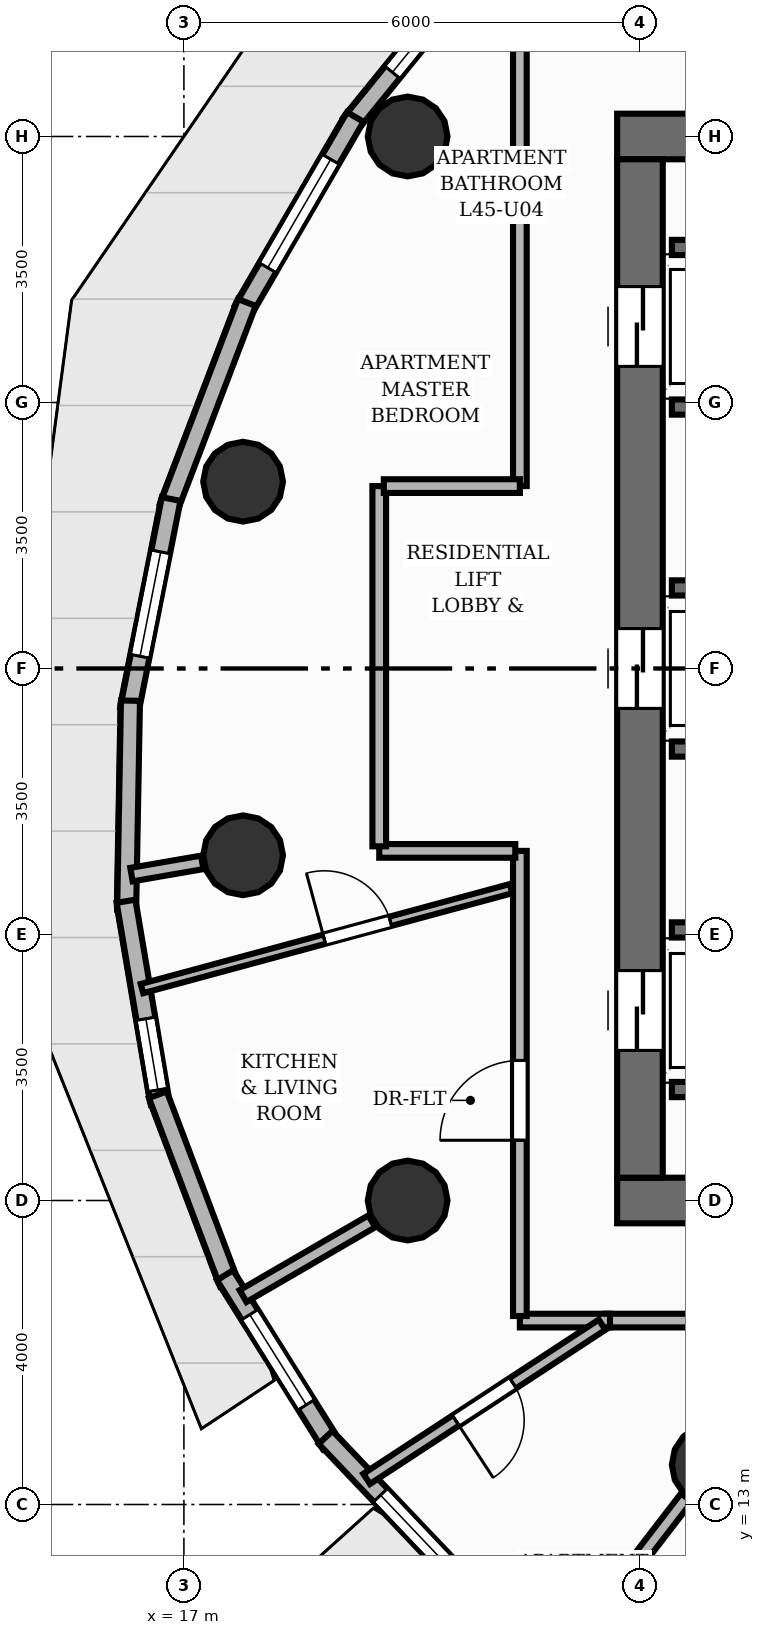
"""IFC4 building model, lengths in metres.
Left out: names, types, materials, properties, quantities, classifications, styles, units other than length and angle.
Written with IfcOpenShell. Run it as: python <this file> out.ifc"""

import sys

from ifc_helpers import new_model, si_unit, direction, frame, frame_2d, origin, origin_2d, place, context, subcontext, project, spatial, rectangle, circle, extrude, element, fill, save


model = new_model("IFC4")
c1 = context("Model", 3, precision=1e-05, world=origin(), true_north=direction((0.0, 1.0)))
c2 = subcontext(c1, "Body", "Model", "MODEL_VIEW")
j1 = project(units=[si_unit("LENGTHUNIT", "METRE"), si_unit("PLANEANGLEUNIT", "RADIAN")], contexts=[c1])
p1 = place(None, origin())
s1 = spatial("IfcSite", under=j1, at=p1, CompositionType="ELEMENT")
p2 = place(p1, origin())
s2 = spatial("IfcBuilding", under=s1, at=p2, CompositionType="ELEMENT")
p3 = place(p2, frame((0.0, 0.0, 152.16)))
s3 = spatial("IfcBuildingStorey", under=s2, at=p3, CompositionType="ELEMENT", Elevation=152.16)
p4 = place(p3, frame((22.7, 17.0, 0.0), z_axis=(0.0, 0.0, 1.0), x_axis=(1.0, 0.0, 0.0)))
e1 = element("IfcWall", 1, at=p4, inside=s3, PredefinedType="SHEAR", context=c2, shape_type="SweptSolid", body=[
    extrude(rectangle(XDim=15.1, YDim=0.6, at=frame_2d((7.55, 0.0))), origin(), (0.0, 0.0, 1.0), 3.2),
])
p5 = place(p4, frame((5.8, 0.0, 0.0)))
e2 = element("IfcOpeningElement", 2, at=p5, cuts=e1, PredefinedType="OPENING", context=c2, shape_type="SweptSolid", body=[
    extrude(rectangle(XDim=1.1, YDim=2.15, at=frame_2d((0.55, 1.075))), frame((0.0, 0.31, 0.0), z_axis=(0.0, -1.0, 0.0), x_axis=(1.0, 0.0, 0.0)), (0.0, 0.0, 1.0), 0.62),
])
p6 = place(p4, frame((9.35, 0.0, 0.0)))
e3 = element("IfcOpeningElement", 3, at=p6, cuts=e1, PredefinedType="OPENING", context=c2, shape_type="SweptSolid", body=[
    extrude(rectangle(XDim=0.9, YDim=2.1, at=frame_2d((0.45, 1.05))), frame((0.0, 0.31, 0.0), z_axis=(0.0, -1.0, 0.0), x_axis=(1.0, 0.0, 0.0)), (0.0, 0.0, 1.0), 0.62),
])
p7 = place(p3, frame((22.7, 31.0, 0.0), z_axis=(0.0, 0.0, 1.0), x_axis=(1.0, 0.0, 0.0)))
e4 = element("IfcWall", 4, at=p7, inside=s3, PredefinedType="SHEAR", context=c2, shape_type="SweptSolid", body=[
    extrude(rectangle(XDim=15.1, YDim=0.6, at=frame_2d((7.55, 0.0))), origin(), (0.0, 0.0, 1.0), 3.2),
])
p8 = place(p7, frame((11.7, 0.0, 0.0)))
e5 = element("IfcOpeningElement", 5, at=p8, cuts=e4, PredefinedType="OPENING", context=c2, shape_type="SweptSolid", body=[
    extrude(rectangle(XDim=1.1, YDim=2.15, at=frame_2d((0.55, 1.075))), frame((0.0, 0.31, 0.0), z_axis=(0.0, -1.0, 0.0), x_axis=(1.0, 0.0, 0.0)), (0.0, 0.0, 1.0), 0.62),
])
p9 = place(p3, frame((23.0, 17.3, 0.0), z_axis=(0.0, 0.0, 1.0), x_axis=(0.0, 1.0, 0.0)))
e6 = element("IfcWall", 6, at=p9, inside=s3, PredefinedType="SHEAR", context=c2, shape_type="SweptSolid", body=[
    extrude(rectangle(XDim=13.4, YDim=0.6, at=frame_2d((6.7, 0.0))), origin(), (0.0, 0.0, 1.0), 3.2),
])
p10 = place(p9, frame((1.675, 0.0, 0.0)))
e7 = element("IfcOpeningElement", 7, at=p10, cuts=e6, PredefinedType="OPENING", context=c2, shape_type="SweptSolid", body=[
    extrude(rectangle(XDim=1.05, YDim=2.15, at=frame_2d((0.525, 1.075))), frame((0.0, 0.31, 0.0), z_axis=(0.0, -1.0, 0.0), x_axis=(1.0, 0.0, 0.0)), (0.0, 0.0, 1.0), 0.62),
])
p11 = place(p9, frame((6.175, 0.0, 0.0)))
e8 = element("IfcOpeningElement", 8, at=p11, cuts=e6, PredefinedType="OPENING", context=c2, shape_type="SweptSolid", body=[
    extrude(rectangle(XDim=1.05, YDim=2.15, at=frame_2d((0.525, 1.075))), frame((0.0, 0.31, 0.0), z_axis=(0.0, -1.0, 0.0), x_axis=(1.0, 0.0, 0.0)), (0.0, 0.0, 1.0), 0.62),
])
p12 = place(p9, frame((10.675, 0.0, 0.0)))
e9 = element("IfcOpeningElement", 9, at=p12, cuts=e6, PredefinedType="OPENING", context=c2, shape_type="SweptSolid", body=[
    extrude(rectangle(XDim=1.05, YDim=2.15, at=frame_2d((0.525, 1.075))), frame((0.0, 0.31, 0.0), z_axis=(0.0, -1.0, 0.0), x_axis=(1.0, 0.0, 0.0)), (0.0, 0.0, 1.0), 0.62),
])
for number, where, z_axis, x_axis in (
    (10, (19.944, 31.0, 0.0), (0.0, 0.0, 1.0), (1.0, 0.0, 0.0)),
    (11, (17.779, 26.458, 0.0), (0.0, 0.0, 1.0), (1.0, 0.0, 0.0)),
    (12, (17.779, 21.542, 0.0), (0.0, 0.0, 1.0), (1.0, 0.0, 0.0)),
    (13, (19.944, 17.0, 0.0), (0.0, 0.0, 1.0), (1.0, 0.0, 0.0)),
    (14, (23.944, 13.523, 0.0), (0.0, 0.0, 1.0), (1.0, 0.0, 0.0)),
):
    element("IfcColumn", number, at=place(p3, frame(where, z_axis=z_axis, x_axis=x_axis)), inside=s3, PredefinedType="COLUMN", context=c2, shape_type="SweptSolid", body=[
        extrude(circle(Radius=0.525, at=origin_2d()), origin(), (0.0, 0.0, 1.0), 3.2),
    ])
p13 = place(p3, frame((19.193, 31.167, 0.0), z_axis=(0.0, 0.0, 1.0), x_axis=(0.630478385784, 0.776206805599, 0.0)))
e15 = element("IfcWall", 15, at=p13, inside=s3, PredefinedType="SOLIDWALL", context=c2, shape_type="SweptSolid", body=[
    extrude(rectangle(XDim=2.977, YDim=0.25, at=frame_2d((1.489, 0.0))), origin(), (0.0, 0.0, 1.0), 2.96),
])
p14 = place(p13, frame((0.873, 0.0, 0.85)))
e16 = element("IfcOpeningElement", 16, at=p14, cuts=e15, PredefinedType="OPENING", context=c2, shape_type="SweptSolid", body=[
    extrude(rectangle(XDim=1.65, YDim=1.55, at=frame_2d((0.825, 0.775))), frame((0.0, 0.135, 0.0), z_axis=(0.0, -1.0, 0.0), x_axis=(1.0, 0.0, 0.0)), (0.0, 0.0, 1.0), 0.27),
])
p15 = place(p3, frame((17.781, 28.717, 0.0), z_axis=(0.0, 0.0, 1.0), x_axis=(0.502009170613, 0.864862296912, 0.0)))
e17 = element("IfcWall", 17, at=p15, inside=s3, PredefinedType="SOLIDWALL", context=c2, shape_type="SweptSolid", body=[
    extrude(rectangle(XDim=2.937, YDim=0.25, at=frame_2d((1.469, 0.0))), origin(), (0.0, 0.0, 1.0), 2.96),
])
p16 = place(p15, frame((0.643, 0.0, 0.85)))
e18 = element("IfcOpeningElement", 18, at=p16, cuts=e17, PredefinedType="OPENING", context=c2, shape_type="SweptSolid", body=[
    extrude(rectangle(XDim=1.65, YDim=1.55, at=frame_2d((0.825, 0.775))), frame((0.0, 0.135, 0.0), z_axis=(0.0, -1.0, 0.0), x_axis=(1.0, 0.0, 0.0)), (0.0, 0.0, 1.0), 0.27),
])
p17 = place(p3, frame((16.802, 26.123, 0.0), z_axis=(0.0, 0.0, 1.0), x_axis=(0.356178525313, 0.934417924756, 0.0)))
e19 = element("IfcWall", 19, at=p17, inside=s3, PredefinedType="SOLIDWALL", context=c2, shape_type="SweptSolid", body=[
    extrude(rectangle(XDim=2.882, YDim=0.25, at=frame_2d((1.441, 0.0))), origin(), (0.0, 0.0, 1.0), 2.96),
])
p18 = place(p3, frame((16.285, 23.466, 0.0), z_axis=(0.0, 0.0, 1.0), x_axis=(0.194099406303, 0.980981865517, 0.0)))
e20 = element("IfcWall", 20, at=p18, inside=s3, PredefinedType="SOLIDWALL", context=c2, shape_type="SweptSolid", body=[
    extrude(rectangle(XDim=2.817, YDim=0.25, at=frame_2d((1.409, 0.0))), origin(), (0.0, 0.0, 1.0), 2.96),
])
p19 = place(p18, frame((0.709, 0.0, 0.85)))
e21 = element("IfcOpeningElement", 21, at=p19, cuts=e20, PredefinedType="OPENING", context=c2, shape_type="SweptSolid", body=[
    extrude(rectangle(XDim=1.4, YDim=1.55, at=frame_2d((0.7, 0.775))), frame((0.0, 0.135, 0.0), z_axis=(0.0, -1.0, 0.0), x_axis=(1.0, 0.0, 0.0)), (0.0, 0.0, 1.0), 0.27),
])
p20 = place(p3, frame((16.247, 20.825, 0.0), z_axis=(0.0, 0.0, 1.0), x_axis=(0.018273942119, 0.999833017578, 0.0)))
e22 = element("IfcWall", 22, at=p20, inside=s3, PredefinedType="SOLIDWALL", context=c2, shape_type="SweptSolid", body=[
    extrude(rectangle(XDim=2.752, YDim=0.25, at=frame_2d((1.376, 0.0))), origin(), (0.0, 0.0, 1.0), 2.96),
])
p21 = place(p3, frame((16.687, 18.282, 0.0), z_axis=(0.0, 0.0, 1.0), x_axis=(-0.166721354457, 0.9860040517, 0.0)))
e23 = element("IfcWall", 23, at=p21, inside=s3, PredefinedType="SOLIDWALL", context=c2, shape_type="SweptSolid", body=[
    extrude(rectangle(XDim=2.693, YDim=0.25, at=frame_2d((1.346, 0.0))), origin(), (0.0, 0.0, 1.0), 2.96),
])
p22 = place(p21, frame((0.175, 0.0, 0.85)))
e24 = element("IfcOpeningElement", 24, at=p22, cuts=e23, PredefinedType="OPENING", context=c2, shape_type="SweptSolid", body=[
    extrude(rectangle(XDim=0.95, YDim=1.45, at=frame_2d((0.475, 0.725))), frame((0.0, 0.135, 0.0), z_axis=(0.0, -1.0, 0.0), x_axis=(1.0, 0.0, 0.0)), (0.0, 0.0, 1.0), 0.27),
])
p23 = place(p3, frame((17.592, 15.914, 0.0), z_axis=(0.0, 0.0, 1.0), x_axis=(-0.353022229402, 0.93561493444, 0.0)))
e25 = element("IfcWall", 25, at=p23, inside=s3, PredefinedType="SOLIDWALL", context=c2, shape_type="SweptSolid", body=[
    extrude(rectangle(XDim=2.648, YDim=0.25, at=frame_2d((1.324, 0.0))), origin(), (0.0, 0.0, 1.0), 2.96),
])
p24 = place(p3, frame((18.934, 13.793, 0.0), z_axis=(0.0, 0.0, 1.0), x_axis=(-0.530726374543, 0.847543223302, 0.0)))
e26 = element("IfcWall", 26, at=p24, inside=s3, PredefinedType="SOLIDWALL", context=c2, shape_type="SweptSolid", body=[
    extrude(rectangle(XDim=2.624, YDim=0.25, at=frame_2d((1.312, 0.0))), origin(), (0.0, 0.0, 1.0), 2.96),
])
p25 = place(p24, frame((0.612, 0.0, 0.85)))
e27 = element("IfcOpeningElement", 27, at=p25, cuts=e26, PredefinedType="OPENING", context=c2, shape_type="SweptSolid", body=[
    extrude(rectangle(XDim=1.4, YDim=1.45, at=frame_2d((0.7, 0.725))), frame((0.0, 0.135, 0.0), z_axis=(0.0, -1.0, 0.0), x_axis=(1.0, 0.0, 0.0)), (0.0, 0.0, 1.0), 0.27),
])
p26 = place(p3, frame((20.672, 11.981, 0.0), z_axis=(0.0, 0.0, 1.0), x_axis=(-0.688923042016, 0.724834492957, 0.0)))
e28 = element("IfcWall", 28, at=p26, inside=s3, PredefinedType="SOLIDWALL", context=c2, shape_type="SweptSolid", body=[
    extrude(rectangle(XDim=2.624, YDim=0.25, at=frame_2d((1.312, 0.0))), origin(), (0.0, 0.0, 1.0), 2.96),
])
p27 = place(p26, frame((0.175, 0.0, 0.85)))
e29 = element("IfcOpeningElement", 29, at=p27, cuts=e28, PredefinedType="OPENING", context=c2, shape_type="SweptSolid", body=[
    extrude(rectangle(XDim=1.4, YDim=1.55, at=frame_2d((0.7, 0.775))), frame((0.0, 0.135, 0.0), z_axis=(0.0, -1.0, 0.0), x_axis=(1.0, 0.0, 0.0)), (0.0, 0.0, 1.0), 0.27),
])
for number, where, z_axis, x_axis in (
    (30, (23.42, 18.46, 0.0), (0.0, 0.0, 1.0), (1.0, 0.0, 0.0)),
    (31, (23.42, 29.54, 0.0), (0.0, 0.0, 1.0), (1.0, 0.0, 0.0)),
    (32, (23.42, 20.56, 0.0), (0.0, 0.0, 1.0), (1.0, 0.0, 0.0)),
    (33, (23.42, 22.94, 0.0), (0.0, 0.0, 1.0), (1.0, 0.0, 0.0)),
    (34, (23.42, 25.06, 0.0), (0.0, 0.0, 1.0), (1.0, 0.0, 0.0)),
    (35, (23.42, 27.44, 0.0), (0.0, 0.0, 1.0), (1.0, 0.0, 0.0)),
):
    element("IfcWall", number, at=place(p3, frame(where, z_axis=z_axis, x_axis=x_axis)), inside=s3, PredefinedType="SHEAR", context=c2, shape_type="SweptSolid", body=[
        extrude(rectangle(XDim=1.71, YDim=0.2, at=frame_2d((0.855, 0.0))), origin(), (0.0, 0.0, 1.0), 3.2),
    ])
p28 = place(p3, frame((17.242, 21.449, 0.0), z_axis=(0.0, 0.0, 1.0), x_axis=(-0.985363023372, -0.170469094476, 0.0)))
e36 = element("IfcWall", 36, at=p28, inside=s3, PredefinedType="PARTITIONING", context=c2, shape_type="SweptSolid", body=[
    extrude(rectangle(XDim=0.945, YDim=0.18, at=frame_2d((0.473, 0.0))), origin(), (0.0, 0.0, 1.0), 2.336),
])
p29 = place(p3, frame((19.472, 16.726, 0.0), z_axis=(0.0, 0.0, 1.0), x_axis=(-0.864794183852, -0.502126497584, 0.0)))
e37 = element("IfcWall", 37, at=p29, inside=s3, PredefinedType="PARTITIONING", context=c2, shape_type="SweptSolid", body=[
    extrude(rectangle(XDim=1.959, YDim=0.18, at=frame_2d((0.979, 0.0))), origin(), (0.0, 0.0, 1.0), 2.336),
])
p30 = place(p3, frame((23.612, 13.092, 0.0), z_axis=(0.0, 0.0, 1.0), x_axis=(-0.609529171404, -0.79276364019, 0.0)))
e38 = element("IfcWall", 38, at=p30, inside=s3, PredefinedType="PARTITIONING", context=c2, shape_type="SweptSolid", body=[
    extrude(rectangle(XDim=2.534, YDim=0.18, at=frame_2d((1.267, 0.0))), origin(), (0.0, 0.0, 1.0), 2.336),
])
p31 = place(p3, frame((39.08, 15.42, 0.0), z_axis=(0.0, 0.0, 1.0), x_axis=(-1.0, 0.0, 0.0)))
e39 = element("IfcWall", 39, at=p31, inside=s3, PredefinedType="PARTITIONING", context=c2, shape_type="SweptSolid", body=[
    extrude(rectangle(XDim=16.531, YDim=0.18, at=frame_2d((8.266, 0.0))), origin(), (0.0, 0.0, 1.0), 2.955),
])
p32 = place(p31, frame((6.994, 0.0, 0.0)))
e40 = element("IfcOpeningElement", 40, at=p32, cuts=e39, PredefinedType="OPENING", context=c2, shape_type="SweptSolid", body=[
    extrude(rectangle(XDim=1.05, YDim=2.15, at=frame_2d((0.525, 1.075))), frame((0.0, 0.1, 0.0), z_axis=(0.0, -1.0, 0.0), x_axis=(1.0, 0.0, 0.0)), (0.0, 0.0, 1.0), 0.2),
])
p33 = place(p3, frame((21.42, 26.4, 0.0), z_axis=(0.0, 0.0, 1.0), x_axis=(0.0, 1.0, 0.0)))
e41 = element("IfcWall", 41, at=p33, inside=s3, PredefinedType="PARTITIONING", context=c2, shape_type="SweptSolid", body=[
    extrude(rectangle(XDim=6.08, YDim=0.18, at=frame_2d((3.04, 0.0))), origin(), (0.0, 0.0, 1.0), 2.955),
])
p34 = place(p3, frame((22.606, 15.42, 0.0), z_axis=(0.0, 0.0, 1.0), x_axis=(-1.0, 0.0, 0.0)))
e42 = element("IfcWall", 42, at=p34, inside=s3, PredefinedType="PARTITIONING", context=c2, shape_type="SweptSolid", body=[
    extrude(rectangle(XDim=1.186, YDim=0.18, at=frame_2d((0.593, 0.0))), origin(), (0.0, 0.0, 1.0), 2.955),
])
p35 = place(p3, frame((21.42, 15.48, 0.0), z_axis=(0.0, 0.0, 1.0), x_axis=(0.0, 1.0, 0.0)))
e43 = element("IfcWall", 43, at=p35, inside=s3, PredefinedType="PARTITIONING", context=c2, shape_type="SweptSolid", body=[
    extrude(rectangle(XDim=6.12, YDim=0.18, at=frame_2d((3.06, 0.0))), origin(), (0.0, 0.0, 1.0), 2.955),
])
p36 = place(p35, frame((2.312, 0.0, 0.0)))
e44 = element("IfcOpeningElement", 44, at=p36, cuts=e43, PredefinedType="OPENING", context=c2, shape_type="SweptSolid", body=[
    extrude(rectangle(XDim=1.05, YDim=2.15, at=frame_2d((0.525, 1.075))), frame((0.0, 0.1, 0.0), z_axis=(0.0, -1.0, 0.0), x_axis=(1.0, 0.0, 0.0)), (0.0, 0.0, 1.0), 0.2),
])
p37 = place(p3, frame((21.36, 21.6, 0.0), z_axis=(0.0, 0.0, 1.0), x_axis=(-1.0, 0.0, 0.0)))
e45 = element("IfcWall", 45, at=p37, inside=s3, PredefinedType="PARTITIONING", context=c2, shape_type="SweptSolid", body=[
    extrude(rectangle(XDim=1.79, YDim=0.18, at=frame_2d((0.895, 0.0))), origin(), (0.0, 0.0, 1.0), 2.336),
])
p38 = place(p3, frame((19.57, 21.66, 0.0), z_axis=(0.0, 0.0, 1.0), x_axis=(0.0, 1.0, 0.0)))
e46 = element("IfcWall", 46, at=p38, inside=s3, PredefinedType="PARTITIONING", context=c2, shape_type="SweptSolid", body=[
    extrude(rectangle(XDim=4.74, YDim=0.18, at=frame_2d((2.37, 0.0))), origin(), (0.0, 0.0, 1.0), 2.955),
])
p39 = place(p3, frame((19.63, 26.4, 0.0), z_axis=(0.0, 0.0, 1.0), x_axis=(1.0, 0.0, 0.0)))
e47 = element("IfcWall", 47, at=p39, inside=s3, PredefinedType="PARTITIONING", context=c2, shape_type="SweptSolid", body=[
    extrude(rectangle(XDim=1.79, YDim=0.18, at=frame_2d((0.895, 0.0))), origin(), (0.0, 0.0, 1.0), 2.955),
])
p40 = place(p3, frame((21.333, 30.193, 0.0), z_axis=(0.0, 0.0, 1.0), x_axis=(-0.864719901707, 0.50225440923, 0.0)))
e48 = element("IfcWall", 48, at=p40, inside=s3, PredefinedType="PLUMBINGWALL", context=c2, shape_type="SweptSolid", body=[
    extrude(rectangle(XDim=1.09, YDim=0.16, at=frame_2d((0.545, 0.0))), origin(), (0.0, 0.0, 1.0), 2.336),
])
p41 = place(p3, frame((22.502, 15.365, 0.0), z_axis=(0.0, 0.0, 1.0), x_axis=(-0.836626802071, -0.547773305352, 0.0)))
e49 = element("IfcWall", 49, at=p41, inside=s3, PredefinedType="PLUMBINGWALL", context=c2, shape_type="SweptSolid", body=[
    extrude(rectangle(XDim=3.703, YDim=0.16, at=frame_2d((1.852, 0.0))), origin(), (0.0, 0.0, 1.0), 2.955),
])
p42 = place(p41, frame((1.401, 0.0, 0.0)))
e50 = element("IfcOpeningElement", 50, at=p42, cuts=e49, PredefinedType="OPENING", context=c2, shape_type="SweptSolid", body=[
    extrude(rectangle(XDim=0.9, YDim=2.1, at=frame_2d((0.45, 1.05))), frame((0.0, 0.09, 0.0), z_axis=(0.0, -1.0, 0.0), x_axis=(1.0, 0.0, 0.0)), (0.0, 0.0, 1.0), 0.18),
])
p43 = place(p3, frame((16.448, 19.788, 0.0), z_axis=(0.0, 0.0, 1.0), x_axis=(0.965231473287, 0.261396639182, 0.0)))
e51 = element("IfcWall", 51, at=p43, inside=s3, PredefinedType="PARTITIONING", context=c2, shape_type="SweptSolid", body=[
    extrude(rectangle(XDim=5.031, YDim=0.125, at=frame_2d((2.516, 0.0))), origin(), (0.0, 0.0, 1.0), 2.955),
])
p44 = place(p43, frame((2.486, 0.0, 0.0)))
e52 = element("IfcOpeningElement", 52, at=p44, cuts=e51, PredefinedType="OPENING", context=c2, shape_type="SweptSolid", body=[
    extrude(rectangle(XDim=0.9, YDim=2.1, at=frame_2d((0.45, 1.05))), frame((0.0, 0.073, 0.0), z_axis=(0.0, -1.0, 0.0), x_axis=(1.0, 0.0, 0.0)), (0.0, 0.0, 1.0), 0.145),
])
p45 = place(p14, origin())
e53 = element("IfcWindow", 53, at=p45, inside=s3, PartitioningType="SINGLE_PANEL", PredefinedType="WINDOW", context=c2, shape_type="SweptSolid", body=[
    extrude(rectangle(XDim=1.65, YDim=1.55, at=frame_2d((0.825, 0.775))), frame((0.0, 0.03, 0.0), z_axis=(0.0, -1.0, 0.0), x_axis=(1.0, 0.0, 0.0)), (0.0, 0.0, 1.0), 0.06),
])
fill(e16, e53)
p46 = place(p16, origin())
e54 = element("IfcWindow", 54, at=p46, inside=s3, PartitioningType="SINGLE_PANEL", PredefinedType="WINDOW", context=c2, shape_type="SweptSolid", body=[
    extrude(rectangle(XDim=1.65, YDim=1.55, at=frame_2d((0.825, 0.775))), frame((0.0, 0.03, 0.0), z_axis=(0.0, -1.0, 0.0), x_axis=(1.0, 0.0, 0.0)), (0.0, 0.0, 1.0), 0.06),
])
fill(e18, e54)
p47 = place(p19, origin())
e55 = element("IfcWindow", 55, at=p47, inside=s3, PartitioningType="SINGLE_PANEL", PredefinedType="WINDOW", context=c2, shape_type="SweptSolid", body=[
    extrude(rectangle(XDim=1.4, YDim=1.55, at=frame_2d((0.7, 0.775))), frame((0.0, 0.03, 0.0), z_axis=(0.0, -1.0, 0.0), x_axis=(1.0, 0.0, 0.0)), (0.0, 0.0, 1.0), 0.06),
])
fill(e21, e55)
p48 = place(p22, origin())
e56 = element("IfcWindow", 56, at=p48, inside=s3, PartitioningType="SINGLE_PANEL", PredefinedType="WINDOW", context=c2, shape_type="SweptSolid", body=[
    extrude(rectangle(XDim=0.95, YDim=1.45, at=frame_2d((0.475, 0.725))), frame((0.0, 0.03, 0.0), z_axis=(0.0, -1.0, 0.0), x_axis=(1.0, 0.0, 0.0)), (0.0, 0.0, 1.0), 0.06),
])
fill(e24, e56)
p49 = place(p25, origin())
e57 = element("IfcWindow", 57, at=p49, inside=s3, PartitioningType="SINGLE_PANEL", PredefinedType="WINDOW", context=c2, shape_type="SweptSolid", body=[
    extrude(rectangle(XDim=1.4, YDim=1.45, at=frame_2d((0.7, 0.725))), frame((0.0, 0.03, 0.0), z_axis=(0.0, -1.0, 0.0), x_axis=(1.0, 0.0, 0.0)), (0.0, 0.0, 1.0), 0.06),
])
fill(e27, e57)
p50 = place(p27, origin())
e58 = element("IfcWindow", 58, at=p50, inside=s3, PartitioningType="SINGLE_PANEL", PredefinedType="WINDOW", context=c2, shape_type="SweptSolid", body=[
    extrude(rectangle(XDim=1.4, YDim=1.55, at=frame_2d((0.7, 0.775))), frame((0.0, 0.03, 0.0), z_axis=(0.0, -1.0, 0.0), x_axis=(1.0, 0.0, 0.0)), (0.0, 0.0, 1.0), 0.06),
])
fill(e29, e58)
p51 = place(p10, origin())
e59 = element("IfcDoor", 59, at=p51, inside=s3, OperationType="DOUBLE_DOOR_SLIDING", PredefinedType="DOOR", context=c2, shape_type="SweptSolid", body=[
    extrude(rectangle(XDim=1.05, YDim=2.15, at=frame_2d((0.525, 1.075))), frame((0.0, 0.025, 0.0), z_axis=(0.0, -1.0, 0.0), x_axis=(1.0, 0.0, 0.0)), (0.0, 0.0, 1.0), 0.05),
])
fill(e7, e59)
p52 = place(p11, origin())
e60 = element("IfcDoor", 60, at=p52, inside=s3, OperationType="DOUBLE_DOOR_SLIDING", PredefinedType="DOOR", context=c2, shape_type="SweptSolid", body=[
    extrude(rectangle(XDim=1.05, YDim=2.15, at=frame_2d((0.525, 1.075))), frame((0.0, 0.025, 0.0), z_axis=(0.0, -1.0, 0.0), x_axis=(1.0, 0.0, 0.0)), (0.0, 0.0, 1.0), 0.05),
])
fill(e8, e60)
p53 = place(p12, origin())
e61 = element("IfcDoor", 61, at=p53, inside=s3, OperationType="DOUBLE_DOOR_SLIDING", PredefinedType="DOOR", context=c2, shape_type="SweptSolid", body=[
    extrude(rectangle(XDim=1.05, YDim=2.15, at=frame_2d((0.525, 1.075))), frame((0.0, 0.025, 0.0), z_axis=(0.0, -1.0, 0.0), x_axis=(1.0, 0.0, 0.0)), (0.0, 0.0, 1.0), 0.05),
])
fill(e9, e61)
p54 = place(p36, origin())
e62 = element("IfcDoor", 62, at=p54, inside=s3, OperationType="SINGLE_SWING_LEFT", PredefinedType="DOOR", context=c2, shape_type="SweptSolid", body=[
    extrude(rectangle(XDim=1.05, YDim=2.15, at=frame_2d((0.525, 1.075))), frame((0.0, 0.025, 0.0), z_axis=(0.0, -1.0, 0.0), x_axis=(1.0, 0.0, 0.0)), (0.0, 0.0, 1.0), 0.05),
])
fill(e44, e62)
p55 = place(p42, origin())
e63 = element("IfcDoor", 63, at=p55, inside=s3, OperationType="SINGLE_SWING_RIGHT", PredefinedType="DOOR", context=c2, shape_type="SweptSolid", body=[
    extrude(rectangle(XDim=0.9, YDim=2.1, at=frame_2d((0.45, 1.05))), frame((0.0, 0.025, 0.0), z_axis=(0.0, -1.0, 0.0), x_axis=(1.0, 0.0, 0.0)), (0.0, 0.0, 1.0), 0.05),
])
fill(e50, e63)
p56 = place(p44, origin())
e64 = element("IfcDoor", 64, at=p56, inside=s3, OperationType="SINGLE_SWING_LEFT", PredefinedType="DOOR", context=c2, shape_type="SweptSolid", body=[
    extrude(rectangle(XDim=0.9, YDim=2.1, at=frame_2d((0.45, 1.05))), frame((0.0, 0.025, 0.0), z_axis=(0.0, -1.0, 0.0), x_axis=(1.0, 0.0, 0.0)), (0.0, 0.0, 1.0), 0.05),
])
fill(e52, e64)
save(model, sys.argv[1])
